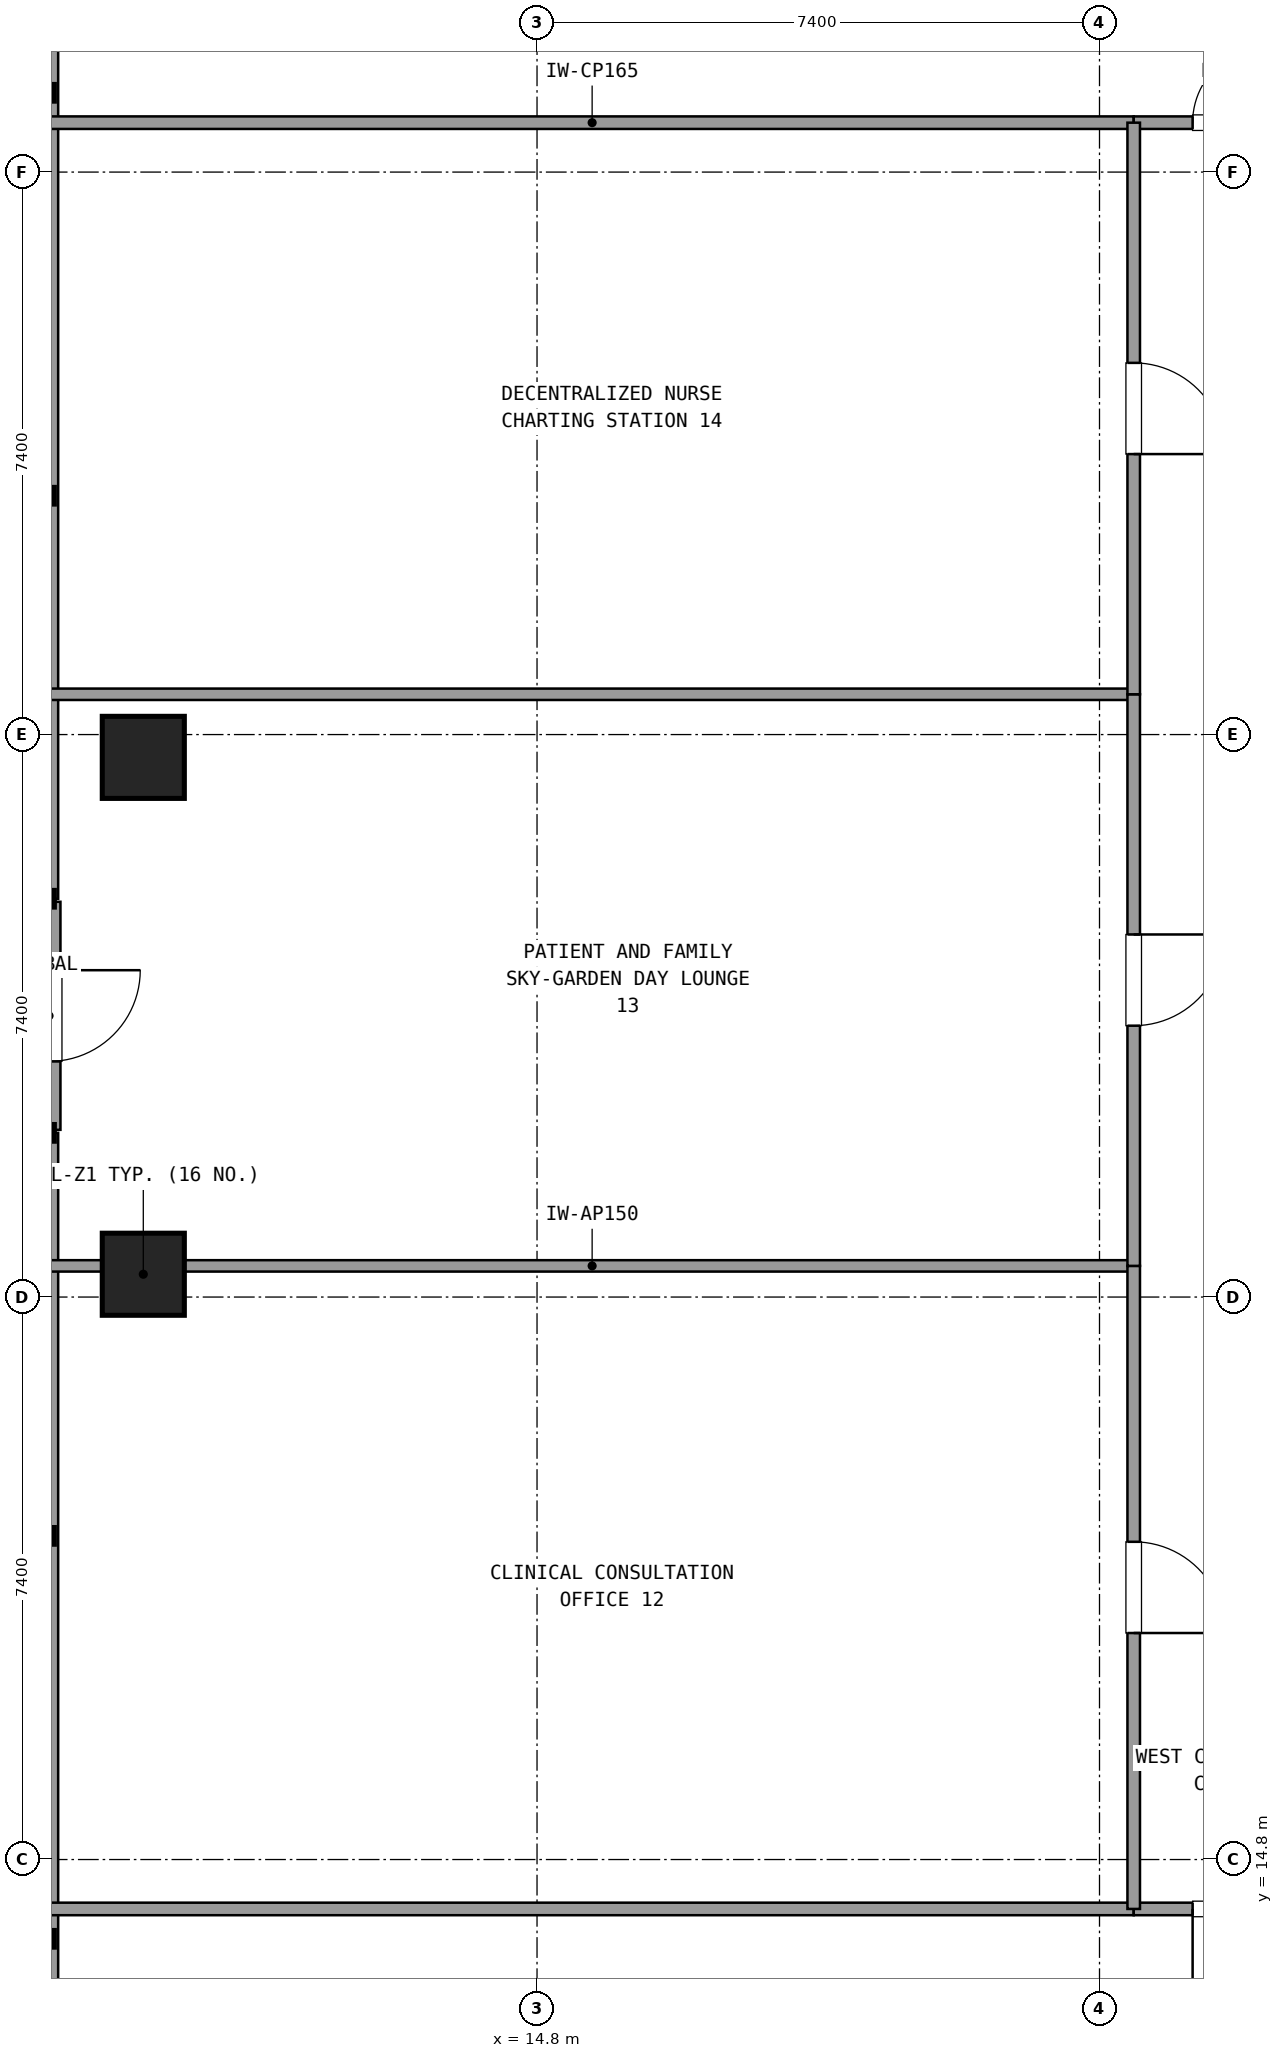
"""IFC4 building model, lengths in metres.
Left out: names, types, materials, properties, quantities, classifications, styles, units other than length and angle.
Written with IfcOpenShell. Run it as: python <this file> out.ifc"""

import sys

from ifc_helpers import new_model, si_unit, direction, frame, frame_2d, origin, origin_2d, place, context, subcontext, project, spatial, rectangle, extrude, element, fill, save


model = new_model("IFC4")
c1 = context("Model", 3, precision=1e-05, world=origin(), true_north=direction((0.0, 1.0)))
c2 = subcontext(c1, "Body", "Model", "MODEL_VIEW")
j1 = project(units=[si_unit("LENGTHUNIT", "METRE"), si_unit("PLANEANGLEUNIT", "RADIAN")], contexts=[c1])
p1 = place(None, origin())
s1 = spatial("IfcSite", under=j1, at=p1, CompositionType="ELEMENT")
p2 = place(p1, origin())
s2 = spatial("IfcBuilding", under=s1, at=p2, CompositionType="ELEMENT")
p3 = place(p2, frame((0.0, 0.0, 27.54)))
s3 = spatial("IfcBuildingStorey", under=s2, at=p3, CompositionType="ELEMENT", Elevation=27.54)
for number, where, z_axis, x_axis in (
    (1, (9.62, 22.5, 0.0), (0.0, 0.0, 1.0), (1.0, 0.0, 0.0)),
    (2, (9.62, 29.3, 0.0), (0.0, 0.0, 1.0), (1.0, 0.0, 0.0)),
):
    element("IfcColumn", number, at=place(p3, frame(where, z_axis=z_axis, x_axis=x_axis)), inside=s3, PredefinedType="COLUMN", context=c2, shape_type="SweptSolid", body=[
        extrude(rectangle(XDim=1.08, YDim=1.08, at=origin_2d()), origin(), (0.0, 0.0, 1.0), 3.6),
    ])
p4 = place(p3, frame((8.38, 27.4, 0.0), z_axis=(0.0, 0.0, 1.0), x_axis=(0.0, -1.0, 0.0)))
e3 = element("IfcWall", 3, at=p4, inside=s3, PredefinedType="SOLIDWALL", context=c2, shape_type="SweptSolid", body=[
    extrude(rectangle(XDim=3.0, YDim=0.3, at=frame_2d((1.5, 0.0))), origin(), (0.0, 0.0, 1.0), 2.65),
])
p5 = place(p4, frame((0.9, 0.0, 0.0)))
e4 = element("IfcOpeningElement", 4, at=p5, cuts=e3, PredefinedType="OPENING", context=c2, shape_type="SweptSolid", body=[
    extrude(rectangle(XDim=1.2, YDim=2.2, at=frame_2d((0.6, 1.1))), frame((0.0, 0.16, 0.0), z_axis=(0.0, -1.0, 0.0), x_axis=(1.0, 0.0, 0.0)), (0.0, 0.0, 1.0), 0.32),
])
for number, where, z_axis, x_axis in (
    (5, (8.38, 43.345, 0.0), (0.0, 0.0, 1.0), (0.0, -1.0, 0.0)),
    (6, (8.38, 24.36, 0.0), (0.0, 0.0, 1.0), (0.0, -1.0, 0.0)),
):
    element("IfcWall", number, at=place(p3, frame(where, z_axis=z_axis, x_axis=x_axis)), inside=s3, PredefinedType="SOLIDWALL", context=c2, shape_type="SweptSolid", body=[
        extrude(rectangle(XDim=15.905, YDim=0.24, at=frame_2d((7.953, 0.0))), origin(), (0.0, 0.0, 1.0), 0.85),
    ])
for number, where, z_axis, x_axis in (
    (7, (8.4, 37.65, 0.0), (0.0, 0.0, 1.0), (1.0, 0.0, 0.0)),
    (8, (8.4, 14.15, 0.0), (0.0, 0.0, 1.0), (1.0, 0.0, 0.0)),
):
    element("IfcWall", number, at=place(p3, frame(where, z_axis=z_axis, x_axis=x_axis)), inside=s3, PredefinedType="PARTITIONING", context=c2, shape_type="SweptSolid", body=[
        extrude(rectangle(XDim=14.25, YDim=0.165, at=frame_2d((7.125, 0.0))), origin(), (0.0, 0.0, 1.0), 2.61),
    ])
p6 = place(p3, frame((22.65, 37.65, 0.0), z_axis=(0.0, 0.0, 1.0), x_axis=(1.0, 0.0, 0.0)))
e9 = element("IfcWall", 9, at=p6, inside=s3, PredefinedType="PARTITIONING", context=c2, shape_type="SweptSolid", body=[
    extrude(rectangle(XDim=2.55, YDim=0.165, at=frame_2d((1.275, 0.0))), origin(), (0.0, 0.0, 1.0), 2.61),
])
p7 = place(p6, frame((0.775, 0.0, 0.0)))
e10 = element("IfcOpeningElement", 10, at=p7, cuts=e9, PredefinedType="OPENING", context=c2, shape_type="SweptSolid", body=[
    extrude(rectangle(XDim=1.0, YDim=2.15, at=frame_2d((0.5, 1.075))), frame((0.0, 0.093, 0.0), z_axis=(0.0, -1.0, 0.0), x_axis=(1.0, 0.0, 0.0)), (0.0, 0.0, 1.0), 0.185),
])
p8 = place(p3, frame((22.65, 14.15, 0.0), z_axis=(0.0, 0.0, 1.0), x_axis=(1.0, 0.0, 0.0)))
e11 = element("IfcWall", 11, at=p8, inside=s3, PredefinedType="PARTITIONING", context=c2, shape_type="SweptSolid", body=[
    extrude(rectangle(XDim=2.55, YDim=0.165, at=frame_2d((1.275, 0.0))), origin(), (0.0, 0.0, 1.0), 2.61),
])
p9 = place(p8, frame((0.775, 0.0, 0.0)))
e12 = element("IfcOpeningElement", 12, at=p9, cuts=e11, PredefinedType="OPENING", context=c2, shape_type="SweptSolid", body=[
    extrude(rectangle(XDim=1.0, YDim=2.15, at=frame_2d((0.5, 1.075))), frame((0.0, 0.093, 0.0), z_axis=(0.0, -1.0, 0.0), x_axis=(1.0, 0.0, 0.0)), (0.0, 0.0, 1.0), 0.185),
])
p10 = place(p3, frame((22.65, 22.61, 0.0), z_axis=(0.0, 0.0, 1.0), x_axis=(-1.0, 0.0, 0.0)))
e13 = element("IfcWall", 13, at=p10, inside=s3, PredefinedType="PARTITIONING", context=c2, shape_type="SweptSolid", body=[
    extrude(rectangle(XDim=14.25, YDim=0.15, at=frame_2d((7.125, 0.0))), origin(), (0.0, 0.0, 1.0), 2.61),
])
p11 = place(p3, frame((22.65, 14.15, 0.0), z_axis=(0.0, 0.0, 1.0), x_axis=(0.0, 1.0, 0.0)))
e14 = element("IfcWall", 14, at=p11, inside=s3, PredefinedType="PARTITIONING", context=c2, shape_type="SweptSolid", body=[
    extrude(rectangle(XDim=8.46, YDim=0.165, at=frame_2d((4.23, 0.0))), origin(), (0.0, 0.0, 1.0), 2.61),
])
p12 = place(p11, frame((3.63, 0.0, 0.0)))
e15 = element("IfcOpeningElement", 15, at=p12, cuts=e14, PredefinedType="OPENING", context=c2, shape_type="SweptSolid", body=[
    extrude(rectangle(XDim=1.2, YDim=2.15, at=frame_2d((0.6, 1.075))), frame((0.0, 0.093, 0.0), z_axis=(0.0, -1.0, 0.0), x_axis=(1.0, 0.0, 0.0)), (0.0, 0.0, 1.0), 0.185),
])
p13 = place(p3, frame((22.65, 30.13, 0.0), z_axis=(0.0, 0.0, 1.0), x_axis=(-1.0, 0.0, 0.0)))
e16 = element("IfcWall", 16, at=p13, inside=s3, PredefinedType="PARTITIONING", context=c2, shape_type="SweptSolid", body=[
    extrude(rectangle(XDim=14.25, YDim=0.15, at=frame_2d((7.125, 0.0))), origin(), (0.0, 0.0, 1.0), 2.61),
])
p14 = place(p3, frame((22.65, 22.61, 0.0), z_axis=(0.0, 0.0, 1.0), x_axis=(0.0, 1.0, 0.0)))
e17 = element("IfcWall", 17, at=p14, inside=s3, PredefinedType="PARTITIONING", context=c2, shape_type="SweptSolid", body=[
    extrude(rectangle(XDim=7.52, YDim=0.165, at=frame_2d((3.76, 0.0))), origin(), (0.0, 0.0, 1.0), 2.61),
])
p15 = place(p14, frame((3.16, 0.0, 0.0)))
e18 = element("IfcOpeningElement", 18, at=p15, cuts=e17, PredefinedType="OPENING", context=c2, shape_type="SweptSolid", body=[
    extrude(rectangle(XDim=1.2, YDim=2.15, at=frame_2d((0.6, 1.075))), frame((0.0, 0.093, 0.0), z_axis=(0.0, -1.0, 0.0), x_axis=(1.0, 0.0, 0.0)), (0.0, 0.0, 1.0), 0.185),
])
p16 = place(p3, frame((22.65, 30.13, 0.0), z_axis=(0.0, 0.0, 1.0), x_axis=(0.0, 1.0, 0.0)))
e19 = element("IfcWall", 19, at=p16, inside=s3, PredefinedType="PARTITIONING", context=c2, shape_type="SweptSolid", body=[
    extrude(rectangle(XDim=7.52, YDim=0.165, at=frame_2d((3.76, 0.0))), origin(), (0.0, 0.0, 1.0), 2.61),
])
p17 = place(p16, frame((3.16, 0.0, 0.0)))
e20 = element("IfcOpeningElement", 20, at=p17, cuts=e19, PredefinedType="OPENING", context=c2, shape_type="SweptSolid", body=[
    extrude(rectangle(XDim=1.2, YDim=2.15, at=frame_2d((0.6, 1.075))), frame((0.0, 0.093, 0.0), z_axis=(0.0, -1.0, 0.0), x_axis=(1.0, 0.0, 0.0)), (0.0, 0.0, 1.0), 0.185),
])
p18 = place(p7, origin())
e21 = element("IfcDoor", 21, at=p18, inside=s3, OperationType="SINGLE_SWING_RIGHT", PredefinedType="DOOR", context=c2, shape_type="SweptSolid", body=[
    extrude(rectangle(XDim=1.0, YDim=2.15, at=frame_2d((0.5, 1.075))), frame((0.0, 0.025, 0.0), z_axis=(0.0, -1.0, 0.0), x_axis=(1.0, 0.0, 0.0)), (0.0, 0.0, 1.0), 0.05),
])
fill(e10, e21)
p19 = place(p9, frame((1.0, 0.0, 0.0), z_axis=(0.0, 0.0, 1.0), x_axis=(-1.0, 0.0, 0.0)))
e22 = element("IfcDoor", 22, at=p19, inside=s3, OperationType="SINGLE_SWING_LEFT", PredefinedType="DOOR", context=c2, shape_type="SweptSolid", body=[
    extrude(rectangle(XDim=1.0, YDim=2.15, at=frame_2d((0.5, 1.075))), frame((0.0, 0.025, 0.0), z_axis=(0.0, -1.0, 0.0), x_axis=(1.0, 0.0, 0.0)), (0.0, 0.0, 1.0), 0.05),
])
fill(e12, e22)
p20 = place(p12, frame((1.2, 0.0, 0.0), z_axis=(0.0, 0.0, 1.0), x_axis=(-1.0, 0.0, 0.0)))
e23 = element("IfcDoor", 23, at=p20, inside=s3, OperationType="SINGLE_SWING_LEFT", PredefinedType="DOOR", context=c2, shape_type="SweptSolid", body=[
    extrude(rectangle(XDim=1.2, YDim=2.15, at=frame_2d((0.6, 1.075))), frame((0.0, 0.025, 0.0), z_axis=(0.0, -1.0, 0.0), x_axis=(1.0, 0.0, 0.0)), (0.0, 0.0, 1.0), 0.05),
])
fill(e15, e23)
p21 = place(p15, frame((1.2, 0.0, 0.0), z_axis=(0.0, 0.0, 1.0), x_axis=(-1.0, 0.0, 0.0)))
e24 = element("IfcDoor", 24, at=p21, inside=s3, OperationType="SINGLE_SWING_RIGHT", PredefinedType="DOOR", context=c2, shape_type="SweptSolid", body=[
    extrude(rectangle(XDim=1.2, YDim=2.15, at=frame_2d((0.6, 1.075))), frame((0.0, 0.025, 0.0), z_axis=(0.0, -1.0, 0.0), x_axis=(1.0, 0.0, 0.0)), (0.0, 0.0, 1.0), 0.05),
])
fill(e18, e24)
p22 = place(p17, frame((1.2, 0.0, 0.0), z_axis=(0.0, 0.0, 1.0), x_axis=(-1.0, 0.0, 0.0)))
e25 = element("IfcDoor", 25, at=p22, inside=s3, OperationType="SINGLE_SWING_LEFT", PredefinedType="DOOR", context=c2, shape_type="SweptSolid", body=[
    extrude(rectangle(XDim=1.2, YDim=2.15, at=frame_2d((0.6, 1.075))), frame((0.0, 0.025, 0.0), z_axis=(0.0, -1.0, 0.0), x_axis=(1.0, 0.0, 0.0)), (0.0, 0.0, 1.0), 0.05),
])
fill(e20, e25)
save(model, sys.argv[1])
